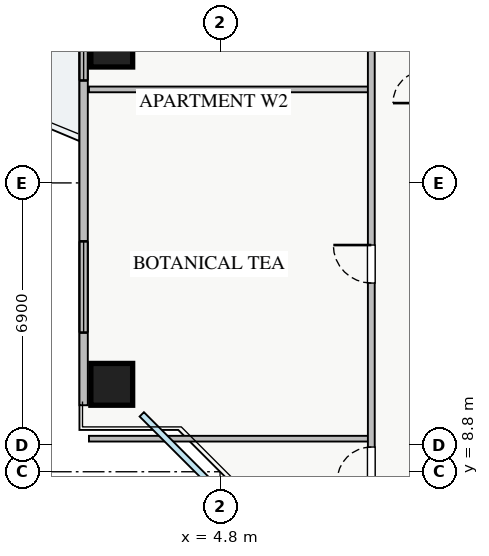
"""IFC4 building model, lengths in metres.
Left out: names, types, materials, properties, quantities, classifications, styles, units other than length and angle.
Written with IfcOpenShell. Run it as: python <this file> out.ifc"""

import sys

from ifc_helpers import new_model, si_unit, direction, frame, frame_2d, origin, origin_2d, place, context, subcontext, project, spatial, rectangle, extrude, source, transform, mapped, element, fill, save


model = new_model("IFC4")
c1 = context("Model", 3, precision=1e-05, world=origin(), true_north=direction((0.0, 1.0)))
c2 = subcontext(c1, "Body", "Model", "MODEL_VIEW")
j1 = project(units=[si_unit("LENGTHUNIT", "METRE"), si_unit("PLANEANGLEUNIT", "RADIAN")], contexts=[c1])
p1 = place(None, origin())
s1 = spatial("IfcSite", under=j1, at=p1, CompositionType="ELEMENT")
p2 = place(p1, origin())
s2 = spatial("IfcBuilding", under=s1, at=p2, CompositionType="ELEMENT")
p3 = place(p2, frame((0.0, 0.0, 110.0)))
s3 = spatial("IfcBuildingStorey", under=s2, at=p3, CompositionType="ELEMENT", Elevation=110.0)
m1 = source(origin(), c2, "Body", "SweptSolid", [
    extrude(rectangle(XDim=1.1, YDim=1.1, at=origin_2d()), origin(), (0.0, 0.0, 1.0), 3.25),
])
for number, where, z_axis, x_axis in (
    (1, (1.95, 20.0, 0.0), (0.0, 0.0, 1.0), (1.0, 0.0, 0.0)),
    (2, (1.95, 11.1, 0.0), (0.0, 0.0, 1.0), (1.0, 0.0, 0.0)),
):
    element("IfcColumn", number, at=place(p3, frame(where, z_axis=z_axis, x_axis=x_axis)), inside=s3, PredefinedType="COLUMN", context=c2, shape_type="MappedRepresentation", body=[
        mapped(m1, transform((0.0, 0.0, 0.0), x_axis=(1.0, 0.0, 0.0), y_axis=(0.0, 1.0, 0.0), z_axis=(0.0, 0.0, 1.0), scale=1.0)),
    ])
p4 = place(p3, frame((1.21, 10.55, 0.0), z_axis=(0.0, 0.0, 1.0), x_axis=(0.0, 1.0, 0.0)))
e3 = element("IfcWall", 3, at=p4, inside=s3, PredefinedType="STANDARD", context=c2, shape_type="SweptSolid", body=[
    extrude(rectangle(XDim=24.9, YDim=0.22, at=frame_2d((12.45, 0.0))), origin(), (0.0, 0.0, 1.0), 2.61),
])
p5 = place(p4, frame((13.3, 0.0, 0.0)))
e4 = element("IfcOpeningElement", 4, at=p5, cuts=e3, PredefinedType="OPENING", context=c2, shape_type="SweptSolid", body=[
    extrude(rectangle(XDim=1.2, YDim=2.1, at=frame_2d((0.6, 1.05))), frame((0.0, 0.12, 0.0), z_axis=(0.0, -1.0, 0.0), x_axis=(1.0, 0.0, 0.0)), (0.0, 0.0, 1.0), 0.24),
])
p6 = place(p4, frame((1.912, 0.0, 0.9)))
e5 = element("IfcOpeningElement", 5, at=p6, cuts=e3, PredefinedType="OPENING", context=c2, shape_type="SweptSolid", body=[
    extrude(rectangle(XDim=2.4, YDim=1.48, at=frame_2d((1.2, 0.74))), frame((0.0, 0.12, 0.0), z_axis=(0.0, -1.0, 0.0), x_axis=(1.0, 0.0, 0.0)), (0.0, 0.0, 1.0), 0.24),
])
p7 = place(p4, frame((21.82, 0.0, 0.9)))
e6 = element("IfcOpeningElement", 6, at=p7, cuts=e3, PredefinedType="OPENING", context=c2, shape_type="SweptSolid", body=[
    extrude(rectangle(XDim=2.1, YDim=1.5, at=frame_2d((1.05, 0.75))), frame((0.0, 0.12, 0.0), z_axis=(0.0, -1.0, 0.0), x_axis=(1.0, 0.0, 0.0)), (0.0, 0.0, 1.0), 0.24),
])
p8 = place(p4, frame((14.72, 0.0, 0.9)))
e7 = element("IfcOpeningElement", 7, at=p8, cuts=e3, PredefinedType="OPENING", context=c2, shape_type="SweptSolid", body=[
    extrude(rectangle(XDim=0.9, YDim=1.2, at=frame_2d((0.45, 0.6))), frame((0.0, 0.12, 0.0), z_axis=(0.0, -1.0, 0.0), x_axis=(1.0, 0.0, 0.0)), (0.0, 0.0, 1.0), 0.24),
])
p9 = place(p4, frame((8.545, 0.0, 0.9)))
e8 = element("IfcOpeningElement", 8, at=p9, cuts=e3, PredefinedType="OPENING", context=c2, shape_type="SweptSolid", body=[
    extrude(rectangle(XDim=0.9, YDim=1.2, at=frame_2d((0.45, 0.6))), frame((0.0, 0.12, 0.0), z_axis=(0.0, -1.0, 0.0), x_axis=(1.0, 0.0, 0.0)), (0.0, 0.0, 1.0), 0.24),
])
p10 = place(p4, frame((16.895, 0.0, 0.9)))
e9 = element("IfcOpeningElement", 9, at=p10, cuts=e3, PredefinedType="OPENING", context=c2, shape_type="SweptSolid", body=[
    extrude(rectangle(XDim=0.9, YDim=1.2, at=frame_2d((0.45, 0.6))), frame((0.0, 0.12, 0.0), z_axis=(0.0, -1.0, 0.0), x_axis=(1.0, 0.0, 0.0)), (0.0, 0.0, 1.0), 0.24),
])
for number, where, z_axis, x_axis in (
    (10, (1.35, 9.67, 0.0), (0.0, 0.0, 1.0), (1.0, 0.0, 0.0)),
    (11, (1.35, 18.86, 0.0), (0.0, 0.0, 1.0), (1.0, 0.0, 0.0)),
):
    element("IfcWall", number, at=place(p3, frame(where, z_axis=z_axis, x_axis=x_axis)), inside=s3, PredefinedType="PARTITIONING", context=c2, shape_type="SweptSolid", body=[
        extrude(rectangle(XDim=7.43, YDim=0.15, at=frame_2d((3.715, 0.0))), origin(), (0.0, 0.0, 1.0), 3.07),
    ])
p11 = place(p3, frame((8.78, 8.31, 0.0), z_axis=(0.0, 0.0, 1.0), x_axis=(0.0, 1.0, 0.0)))
e12 = element("IfcWall", 12, at=p11, inside=s3, PredefinedType="PARTITIONING", context=c2, shape_type="SweptSolid", body=[
    extrude(rectangle(XDim=29.34, YDim=0.18, at=frame_2d((14.67, 0.0))), origin(), (0.0, 0.0, 1.0), 3.07),
])
p12 = place(p11, frame((28.045, 0.0, 0.0)))
e13 = element("IfcOpeningElement", 13, at=p12, cuts=e12, PredefinedType="OPENING", context=c2, shape_type="SweptSolid", body=[
    extrude(rectangle(XDim=0.9, YDim=2.05, at=frame_2d((0.45, 1.025))), frame((0.0, 0.1, 0.0), z_axis=(0.0, -1.0, 0.0), x_axis=(1.0, 0.0, 0.0)), (0.0, 0.0, 1.0), 0.2),
])
p13 = place(p11, frame((0.24, 0.0, 0.0)))
e14 = element("IfcOpeningElement", 14, at=p13, cuts=e12, PredefinedType="OPENING", context=c2, shape_type="SweptSolid", body=[
    extrude(rectangle(XDim=0.9, YDim=2.05, at=frame_2d((0.45, 1.025))), frame((0.0, 0.1, 0.0), z_axis=(0.0, -1.0, 0.0), x_axis=(1.0, 0.0, 0.0)), (0.0, 0.0, 1.0), 0.2),
])
p14 = place(p11, frame((5.455, 0.0, 0.0)))
e15 = element("IfcOpeningElement", 15, at=p14, cuts=e12, PredefinedType="OPENING", context=c2, shape_type="SweptSolid", body=[
    extrude(rectangle(XDim=1.0, YDim=2.05, at=frame_2d((0.5, 1.025))), frame((0.0, 0.1, 0.0), z_axis=(0.0, -1.0, 0.0), x_axis=(1.0, 0.0, 0.0)), (0.0, 0.0, 1.0), 0.2),
])
p15 = place(p11, frame((11.865, 0.0, 0.0)))
e16 = element("IfcOpeningElement", 16, at=p15, cuts=e12, PredefinedType="OPENING", context=c2, shape_type="SweptSolid", body=[
    extrude(rectangle(XDim=1.0, YDim=2.05, at=frame_2d((0.5, 1.025))), frame((0.0, 0.1, 0.0), z_axis=(0.0, -1.0, 0.0), x_axis=(1.0, 0.0, 0.0)), (0.0, 0.0, 1.0), 0.2),
])
p16 = place(p11, frame((20.315, 0.0, 0.0)))
e17 = element("IfcOpeningElement", 17, at=p16, cuts=e12, PredefinedType="OPENING", context=c2, shape_type="SweptSolid", body=[
    extrude(rectangle(XDim=1.0, YDim=2.05, at=frame_2d((0.5, 1.025))), frame((0.0, 0.1, 0.0), z_axis=(0.0, -1.0, 0.0), x_axis=(1.0, 0.0, 0.0)), (0.0, 0.0, 1.0), 0.2),
])
m2 = source(origin(), c2, "Body", "SweptSolid", [
    extrude(rectangle(XDim=2.4, YDim=1.48, at=frame_2d((1.2, 0.74))), frame((0.0, 0.03, 0.0), z_axis=(0.0, -1.0, 0.0), x_axis=(1.0, 0.0, 0.0)), (0.0, 0.0, 1.0), 0.06),
])
p17 = place(p6, origin())
e18 = element("IfcWindow", 18, at=p17, inside=s3, PartitioningType="TRIPLE_PANEL_VERTICAL", PredefinedType="WINDOW", context=c2, shape_type="MappedRepresentation", body=[
    mapped(m2, transform((0.0, 0.0, 0.0), x_axis=(1.0, 0.0, 0.0), y_axis=(0.0, 1.0, 0.0), z_axis=(0.0, 0.0, 1.0), scale=1.0)),
])
fill(e5, e18)
m3 = source(origin(), c2, "Body", "SweptSolid", [
    extrude(rectangle(XDim=0.9, YDim=2.05, at=frame_2d((0.45, 1.025))), frame((0.0, 0.025, 0.0), z_axis=(0.0, -1.0, 0.0), x_axis=(1.0, 0.0, 0.0)), (0.0, 0.0, 1.0), 0.05),
])
p18 = place(p13, origin())
e19 = element("IfcDoor", 19, at=p18, inside=s3, OperationType="SINGLE_SWING_LEFT", PredefinedType="DOOR", context=c2, shape_type="MappedRepresentation", body=[
    mapped(m3, transform((0.0, 0.0, 0.0), x_axis=(1.0, 0.0, 0.0), y_axis=(0.0, 1.0, 0.0), z_axis=(0.0, 0.0, 1.0), scale=1.0)),
])
fill(e14, e19)
m4 = source(origin(), c2, "Body", "SweptSolid", [
    extrude(rectangle(XDim=1.0, YDim=2.05, at=frame_2d((0.5, 1.025))), frame((0.0, 0.025, 0.0), z_axis=(0.0, -1.0, 0.0), x_axis=(1.0, 0.0, 0.0)), (0.0, 0.0, 1.0), 0.05),
])
p19 = place(p14, origin())
e20 = element("IfcDoor", 20, at=p19, inside=s3, OperationType="SINGLE_SWING_RIGHT", PredefinedType="DOOR", context=c2, shape_type="MappedRepresentation", body=[
    mapped(m4, transform((0.0, 0.0, 0.0), x_axis=(1.0, 0.0, 0.0), y_axis=(0.0, 1.0, 0.0), z_axis=(0.0, 0.0, 1.0), scale=1.0)),
])
fill(e15, e20)
m5 = source(origin(), c2, "Body", "SweptSolid", [
    extrude(rectangle(XDim=0.9, YDim=1.2, at=frame_2d((0.45, 0.6))), frame((0.0, 0.03, 0.0), z_axis=(0.0, -1.0, 0.0), x_axis=(1.0, 0.0, 0.0)), (0.0, 0.0, 1.0), 0.06),
])
p20 = place(p9, origin())
e21 = element("IfcWindow", 21, at=p20, inside=s3, PartitioningType="SINGLE_PANEL", PredefinedType="WINDOW", context=c2, shape_type="MappedRepresentation", body=[
    mapped(m5, transform((0.0, 0.0, 0.0), x_axis=(1.0, 0.0, 0.0), y_axis=(0.0, 1.0, 0.0), z_axis=(0.0, 0.0, 1.0), scale=1.0)),
])
fill(e8, e21)
save(model, sys.argv[1])
